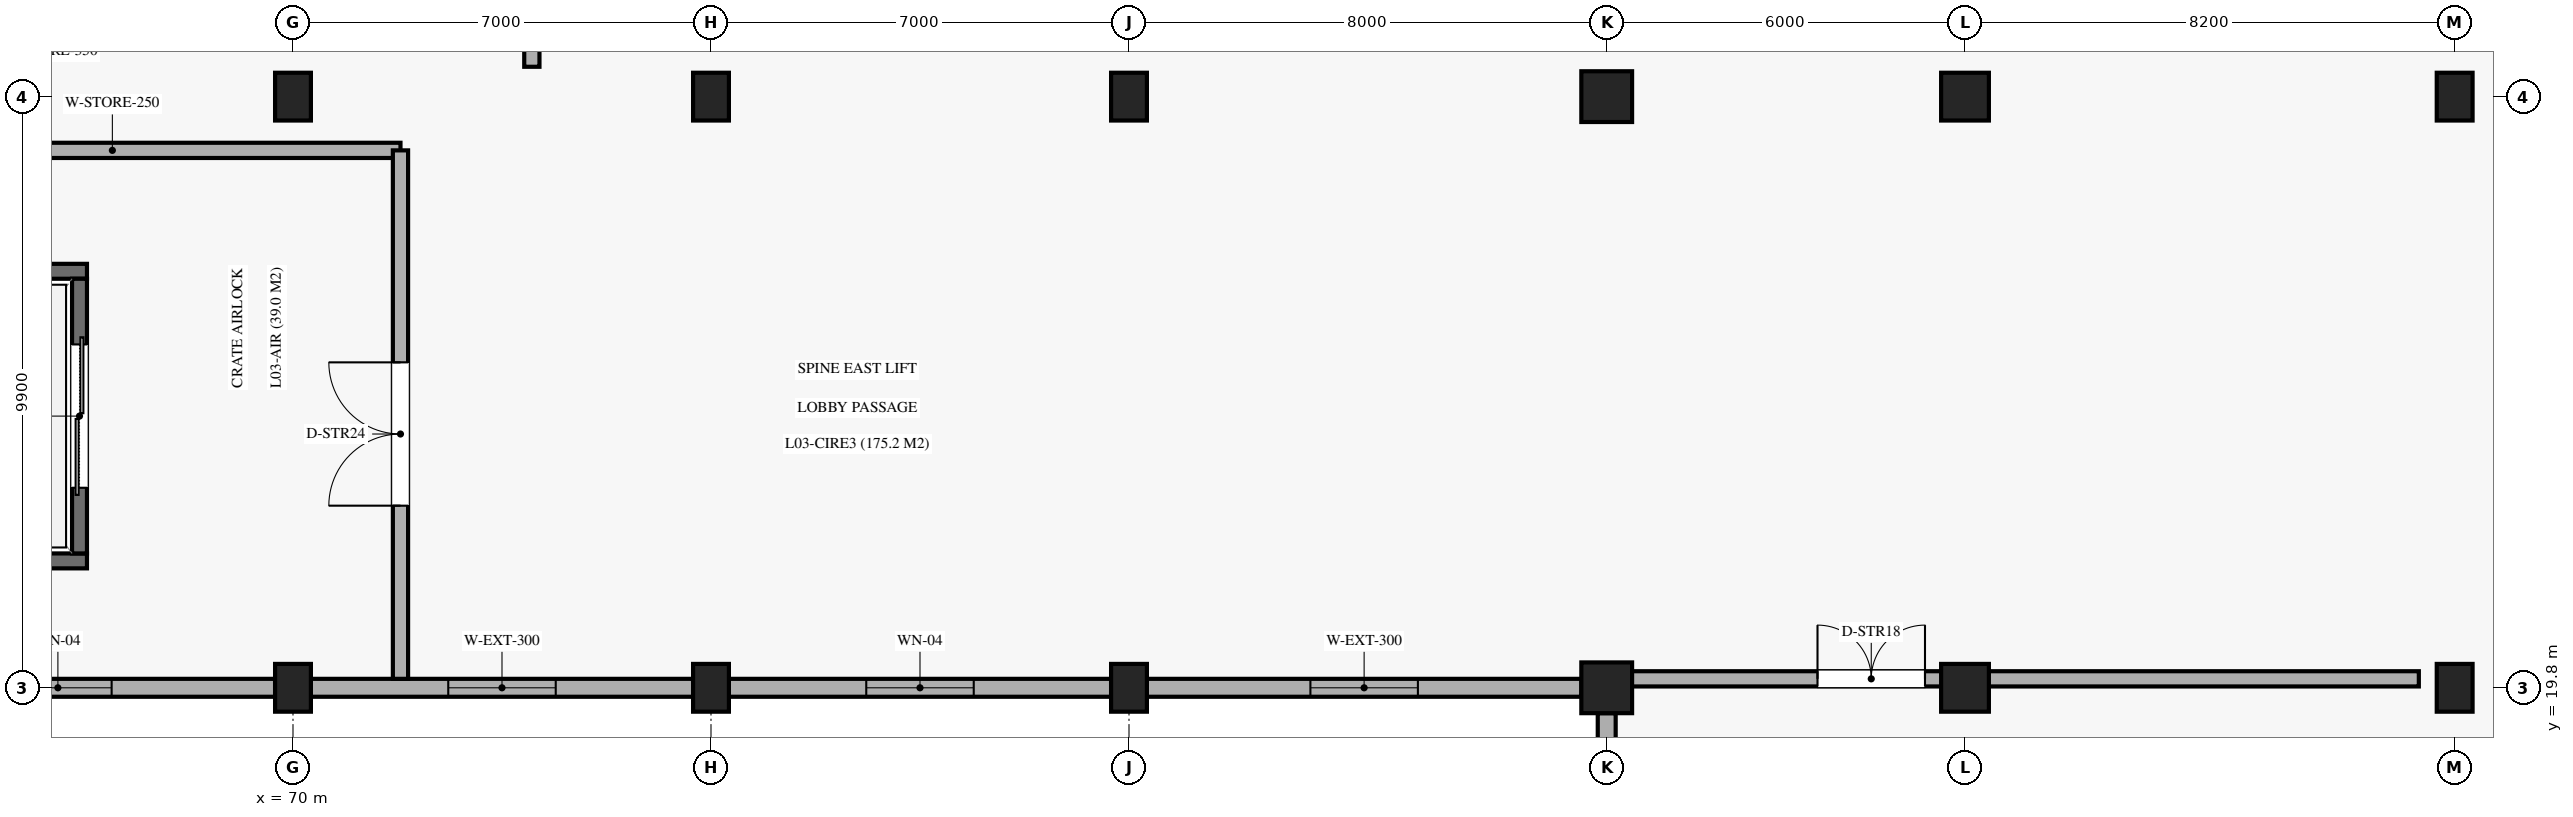
"""IFC4 building model, lengths in metres.
Left out: names, types, materials, properties, quantities, classifications, styles, units other than length and angle.
Written with IfcOpenShell. Run it as: python <this file> out.ifc"""

import sys

from ifc_helpers import new_model, si_unit, direction, frame, frame_2d, origin, origin_2d, place, context, subcontext, project, spatial, rectangle, extrude, element, fill, save


model = new_model("IFC4")
c1 = context("Model", 3, precision=1e-05, world=origin(), true_north=direction((0.0, 1.0)))
c2 = subcontext(c1, "Body", "Model", "MODEL_VIEW")
j1 = project(units=[si_unit("LENGTHUNIT", "METRE"), si_unit("PLANEANGLEUNIT", "RADIAN")], contexts=[c1])
p1 = place(None, origin())
s1 = spatial("IfcSite", under=j1, at=p1, CompositionType="ELEMENT")
p2 = place(p1, origin())
s2 = spatial("IfcBuilding", under=s1, at=p2, CompositionType="ELEMENT")
p3 = place(p2, frame((0.0, 0.0, 16.32)))
s3 = spatial("IfcBuildingStorey", under=s2, at=p3, CompositionType="ELEMENT", Elevation=16.32)
for number, where, z_axis, x_axis in (
    (1, (70.0, 19.8, 0.0), (0.0, 0.0, 1.0), (1.0, 0.0, 0.0)),
    (2, (70.0, 29.7, 0.0), (0.0, 0.0, 1.0), (1.0, 0.0, 0.0)),
    (3, (77.0, 19.8, 0.0), (0.0, 0.0, 1.0), (1.0, 0.0, 0.0)),
    (4, (77.0, 29.7, 0.0), (0.0, 0.0, 1.0), (1.0, 0.0, 0.0)),
    (5, (84.0, 19.8, 0.0), (0.0, 0.0, 1.0), (1.0, 0.0, 0.0)),
    (6, (84.0, 29.7, 0.0), (0.0, 0.0, 1.0), (1.0, 0.0, 0.0)),
):
    element("IfcColumn", number, at=place(p3, frame(where, z_axis=z_axis, x_axis=x_axis)), inside=s3, PredefinedType="COLUMN", context=c2, shape_type="SweptSolid", body=[
        extrude(rectangle(XDim=0.6, YDim=0.8, at=origin_2d()), origin(), (0.0, 0.0, 1.0), 6.12),
    ])
for number, where, z_axis, x_axis in (
    (7, (92.0, 19.8, 0.0), (0.0, 0.0, 1.0), (1.0, 0.0, 0.0)),
    (8, (92.0, 29.7, 0.0), (0.0, 0.0, 1.0), (1.0, 0.0, 0.0)),
):
    element("IfcColumn", number, at=place(p3, frame(where, z_axis=z_axis, x_axis=x_axis)), inside=s3, PredefinedType="COLUMN", context=c2, shape_type="SweptSolid", body=[
        extrude(rectangle(XDim=0.85, YDim=0.85, at=origin_2d()), origin(), (0.0, 0.0, 1.0), 6.12),
    ])
for number, where, z_axis, x_axis in (
    (9, (98.0, 19.8, 0.0), (0.0, 0.0, 1.0), (1.0, 0.0, 0.0)),
    (10, (98.0, 29.7, 0.0), (0.0, 0.0, 1.0), (1.0, 0.0, 0.0)),
):
    element("IfcColumn", number, at=place(p3, frame(where, z_axis=z_axis, x_axis=x_axis)), inside=s3, PredefinedType="COLUMN", context=c2, shape_type="SweptSolid", body=[
        extrude(rectangle(XDim=0.8, YDim=0.8, at=origin_2d()), origin(), (0.0, 0.0, 1.0), 6.12),
    ])
for number, where, z_axis, x_axis in (
    (11, (106.2, 19.8, 0.0), (0.0, 0.0, 1.0), (1.0, 0.0, 0.0)),
    (12, (106.2, 29.7, 0.0), (0.0, 0.0, 1.0), (1.0, 0.0, 0.0)),
):
    element("IfcColumn", number, at=place(p3, frame(where, z_axis=z_axis, x_axis=x_axis)), inside=s3, PredefinedType="COLUMN", context=c2, shape_type="SweptSolid", body=[
        extrude(rectangle(XDim=0.6, YDim=0.8, at=origin_2d()), origin(), (0.0, 0.0, 1.0), 6.12),
    ])
p4 = place(p3, frame((62.425, 19.8, 0.0), z_axis=(0.0, 0.0, 1.0), x_axis=(1.0, 0.0, 0.0)))
e13 = element("IfcWall", 13, at=p4, inside=s3, PredefinedType="SOLIDWALL", context=c2, shape_type="SweptSolid", body=[
    extrude(rectangle(XDim=7.275, YDim=0.3, at=frame_2d((3.637, 0.0))), origin(), (0.0, 0.0, 1.0), 5.08),
])
p5 = place(p4, frame((2.738, 0.0, 1.05)))
e14 = element("IfcOpeningElement", 14, at=p5, cuts=e13, PredefinedType="OPENING", context=c2, shape_type="SweptSolid", body=[
    extrude(rectangle(XDim=1.8, YDim=1.7, at=frame_2d((0.9, 0.85))), frame((0.0, 0.16, 0.0), z_axis=(0.0, -1.0, 0.0), x_axis=(1.0, 0.0, 0.0)), (0.0, 0.0, 1.0), 0.32),
])
p6 = place(p3, frame((70.3, 19.8, 0.0), z_axis=(0.0, 0.0, 1.0), x_axis=(1.0, 0.0, 0.0)))
e15 = element("IfcWall", 15, at=p6, inside=s3, PredefinedType="SOLIDWALL", context=c2, shape_type="SweptSolid", body=[
    extrude(rectangle(XDim=6.4, YDim=0.3, at=frame_2d((3.2, 0.0))), origin(), (0.0, 0.0, 1.0), 5.08),
])
p7 = place(p6, frame((2.3, 0.0, 1.05)))
e16 = element("IfcOpeningElement", 16, at=p7, cuts=e15, PredefinedType="OPENING", context=c2, shape_type="SweptSolid", body=[
    extrude(rectangle(XDim=1.8, YDim=1.7, at=frame_2d((0.9, 0.85))), frame((0.0, 0.16, 0.0), z_axis=(0.0, -1.0, 0.0), x_axis=(1.0, 0.0, 0.0)), (0.0, 0.0, 1.0), 0.32),
])
p8 = place(p3, frame((77.3, 19.8, 0.0), z_axis=(0.0, 0.0, 1.0), x_axis=(1.0, 0.0, 0.0)))
e17 = element("IfcWall", 17, at=p8, inside=s3, PredefinedType="SOLIDWALL", context=c2, shape_type="SweptSolid", body=[
    extrude(rectangle(XDim=6.4, YDim=0.3, at=frame_2d((3.2, 0.0))), origin(), (0.0, 0.0, 1.0), 5.08),
])
p9 = place(p8, frame((2.3, 0.0, 1.05)))
e18 = element("IfcOpeningElement", 18, at=p9, cuts=e17, PredefinedType="OPENING", context=c2, shape_type="SweptSolid", body=[
    extrude(rectangle(XDim=1.8, YDim=1.7, at=frame_2d((0.9, 0.85))), frame((0.0, 0.16, 0.0), z_axis=(0.0, -1.0, 0.0), x_axis=(1.0, 0.0, 0.0)), (0.0, 0.0, 1.0), 0.32),
])
p10 = place(p3, frame((84.3, 19.8, 0.0), z_axis=(0.0, 0.0, 1.0), x_axis=(1.0, 0.0, 0.0)))
e19 = element("IfcWall", 19, at=p10, inside=s3, PredefinedType="SOLIDWALL", context=c2, shape_type="SweptSolid", body=[
    extrude(rectangle(XDim=7.275, YDim=0.3, at=frame_2d((3.637, 0.0))), origin(), (0.0, 0.0, 1.0), 5.08),
])
p11 = place(p10, frame((2.738, 0.0, 1.05)))
e20 = element("IfcOpeningElement", 20, at=p11, cuts=e19, PredefinedType="OPENING", context=c2, shape_type="SweptSolid", body=[
    extrude(rectangle(XDim=1.8, YDim=1.7, at=frame_2d((0.9, 0.85))), frame((0.0, 0.16, 0.0), z_axis=(0.0, -1.0, 0.0), x_axis=(1.0, 0.0, 0.0)), (0.0, 0.0, 1.0), 0.32),
])
p12 = place(p3, frame((92.0, 10.25, 0.0), z_axis=(0.0, 0.0, 1.0), x_axis=(0.0, 1.0, 0.0)))
e21 = element("IfcWall", 21, at=p12, inside=s3, PredefinedType="SOLIDWALL", context=c2, shape_type="SweptSolid", body=[
    extrude(rectangle(XDim=9.125, YDim=0.3, at=frame_2d((4.562, 0.0))), origin(), (0.0, 0.0, 1.0), 5.08),
])
p13 = place(p12, frame((3.663, 0.0, 1.05)))
e22 = element("IfcOpeningElement", 22, at=p13, cuts=e21, PredefinedType="OPENING", context=c2, shape_type="SweptSolid", body=[
    extrude(rectangle(XDim=1.8, YDim=1.7, at=frame_2d((0.9, 0.85))), frame((0.0, 0.16, 0.0), z_axis=(0.0, -1.0, 0.0), x_axis=(1.0, 0.0, 0.0)), (0.0, 0.0, 1.0), 0.32),
])
for number, where, z_axis, x_axis in (
    (23, (62.65, 21.925, 0.0), (0.0, 0.0, 1.0), (1.0, 0.0, 0.0)),
    (24, (62.65, 26.775, 0.0), (0.0, 0.0, 1.0), (1.0, 0.0, 0.0)),
):
    element("IfcWall", number, at=place(p3, frame(where, z_axis=z_axis, x_axis=x_axis)), inside=s3, PredefinedType="SOLIDWALL", context=c2, shape_type="SweptSolid", body=[
        extrude(rectangle(XDim=3.9, YDim=0.25, at=frame_2d((1.95, 0.0))), origin(), (0.0, 0.0, 1.0), 5.84),
    ])
p14 = place(p3, frame((66.425, 22.05, 0.0), z_axis=(0.0, 0.0, 1.0), x_axis=(0.0, 1.0, 0.0)))
e25 = element("IfcWall", 25, at=p14, inside=s3, PredefinedType="SOLIDWALL", context=c2, shape_type="SweptSolid", body=[
    extrude(rectangle(XDim=4.6, YDim=0.25, at=frame_2d((2.3, 0.0))), origin(), (0.0, 0.0, 1.0), 5.84),
])
p15 = place(p14, frame((1.1, 0.0, 0.0)))
e26 = element("IfcOpeningElement", 26, at=p15, cuts=e25, PredefinedType="OPENING", context=c2, shape_type="SweptSolid", body=[
    extrude(rectangle(XDim=2.4, YDim=2.65, at=frame_2d((1.2, 1.325))), frame((0.0, 0.135, 0.0), z_axis=(0.0, -1.0, 0.0), x_axis=(1.0, 0.0, 0.0)), (0.0, 0.0, 1.0), 0.27),
])
p16 = place(p3, frame((62.15, 28.8, 0.0), z_axis=(0.0, 0.0, 1.0), x_axis=(1.0, 0.0, 0.0)))
e27 = element("IfcWall", 27, at=p16, inside=s3, PredefinedType="SOLIDWALL", context=c2, shape_type="SweptSolid", body=[
    extrude(rectangle(XDim=9.65, YDim=0.255, at=frame_2d((4.825, 0.0))), origin(), (0.0, 0.0, 1.0), 4.98),
])
p17 = place(p3, frame((71.8, 19.95, 0.0), z_axis=(0.0, 0.0, 1.0), x_axis=(0.0, 1.0, 0.0)))
e28 = element("IfcWall", 28, at=p17, inside=s3, PredefinedType="SOLIDWALL", context=c2, shape_type="SweptSolid", body=[
    extrude(rectangle(XDim=8.85, YDim=0.255, at=frame_2d((4.425, 0.0))), origin(), (0.0, 0.0, 1.0), 4.98),
])
p18 = place(p17, frame((2.9, 0.0, 0.0)))
e29 = element("IfcOpeningElement", 29, at=p18, cuts=e28, PredefinedType="OPENING", context=c2, shape_type="SweptSolid", body=[
    extrude(rectangle(XDim=2.4, YDim=2.5, at=frame_2d((1.2, 1.25))), frame((0.0, 0.137, 0.0), z_axis=(0.0, -1.0, 0.0), x_axis=(1.0, 0.0, 0.0)), (0.0, 0.0, 1.0), 0.275),
])
p19 = place(p3, frame((92.35, 19.95, 0.0), z_axis=(0.0, 0.0, 1.0), x_axis=(1.0, 0.0, 0.0)))
e30 = element("IfcWall", 30, at=p19, inside=s3, PredefinedType="SOLIDWALL", context=c2, shape_type="SweptSolid", body=[
    extrude(rectangle(XDim=13.25, YDim=0.255, at=frame_2d((6.625, 0.0))), origin(), (0.0, 0.0, 1.0), 4.98),
])
p20 = place(p19, frame((3.18, 0.0, 0.0)))
e31 = element("IfcOpeningElement", 31, at=p20, cuts=e30, PredefinedType="OPENING", context=c2, shape_type="SweptSolid", body=[
    extrude(rectangle(XDim=1.8, YDim=2.35, at=frame_2d((0.9, 1.175))), frame((0.0, 0.137, 0.0), z_axis=(0.0, -1.0, 0.0), x_axis=(1.0, 0.0, 0.0)), (0.0, 0.0, 1.0), 0.275),
])
p21 = place(p3, frame((74.0, 30.2, 0.0), z_axis=(0.0, 0.0, 1.0), x_axis=(0.0, 1.0, 0.0)))
e32 = element("IfcWall", 32, at=p21, inside=s3, PredefinedType="SOLIDWALL", context=c2, shape_type="SweptSolid", body=[
    extrude(rectangle(XDim=18.6, YDim=0.255, at=frame_2d((9.3, 0.0))), origin(), (0.0, 0.0, 1.0), 4.98),
])
p22 = place(p21, frame((7.0, 0.0, 0.0)))
e33 = element("IfcOpeningElement", 33, at=p22, cuts=e32, PredefinedType="OPENING", context=c2, shape_type="SweptSolid", body=[
    extrude(rectangle(XDim=1.8, YDim=2.35, at=frame_2d((0.9, 1.175))), frame((0.0, 0.137, 0.0), z_axis=(0.0, -1.0, 0.0), x_axis=(1.0, 0.0, 0.0)), (0.0, 0.0, 1.0), 0.275),
])
p23 = place(p5, origin())
e34 = element("IfcWindow", 34, at=p23, inside=s3, PartitioningType="SINGLE_PANEL", PredefinedType="WINDOW", context=c2, shape_type="SweptSolid", body=[
    extrude(rectangle(XDim=1.8, YDim=1.7, at=frame_2d((0.9, 0.85))), frame((0.0, 0.03, 0.0), z_axis=(0.0, -1.0, 0.0), x_axis=(1.0, 0.0, 0.0)), (0.0, 0.0, 1.0), 0.06),
])
fill(e14, e34)
p24 = place(p7, origin())
e35 = element("IfcWindow", 35, at=p24, inside=s3, PartitioningType="SINGLE_PANEL", PredefinedType="WINDOW", context=c2, shape_type="SweptSolid", body=[
    extrude(rectangle(XDim=1.8, YDim=1.7, at=frame_2d((0.9, 0.85))), frame((0.0, 0.03, 0.0), z_axis=(0.0, -1.0, 0.0), x_axis=(1.0, 0.0, 0.0)), (0.0, 0.0, 1.0), 0.06),
])
fill(e16, e35)
p25 = place(p9, origin())
e36 = element("IfcWindow", 36, at=p25, inside=s3, PartitioningType="SINGLE_PANEL", PredefinedType="WINDOW", context=c2, shape_type="SweptSolid", body=[
    extrude(rectangle(XDim=1.8, YDim=1.7, at=frame_2d((0.9, 0.85))), frame((0.0, 0.03, 0.0), z_axis=(0.0, -1.0, 0.0), x_axis=(1.0, 0.0, 0.0)), (0.0, 0.0, 1.0), 0.06),
])
fill(e18, e36)
p26 = place(p11, origin())
e37 = element("IfcWindow", 37, at=p26, inside=s3, PartitioningType="SINGLE_PANEL", PredefinedType="WINDOW", context=c2, shape_type="SweptSolid", body=[
    extrude(rectangle(XDim=1.8, YDim=1.7, at=frame_2d((0.9, 0.85))), frame((0.0, 0.03, 0.0), z_axis=(0.0, -1.0, 0.0), x_axis=(1.0, 0.0, 0.0)), (0.0, 0.0, 1.0), 0.06),
])
fill(e20, e37)
p27 = place(p15, origin())
e38 = element("IfcDoor", 38, at=p27, inside=s3, OperationType="DOUBLE_DOOR_SLIDING", PredefinedType="DOOR", context=c2, shape_type="SweptSolid", body=[
    extrude(rectangle(XDim=2.4, YDim=2.65, at=frame_2d((1.2, 1.325))), frame((0.0, 0.025, 0.0), z_axis=(0.0, -1.0, 0.0), x_axis=(1.0, 0.0, 0.0)), (0.0, 0.0, 1.0), 0.05),
])
fill(e26, e38)
p28 = place(p18, origin())
e39 = element("IfcDoor", 39, at=p28, inside=s3, OperationType="DOUBLE_DOOR_SINGLE_SWING", PredefinedType="DOOR", context=c2, shape_type="SweptSolid", body=[
    extrude(rectangle(XDim=2.4, YDim=2.5, at=frame_2d((1.2, 1.25))), frame((0.0, 0.025, 0.0), z_axis=(0.0, -1.0, 0.0), x_axis=(1.0, 0.0, 0.0)), (0.0, 0.0, 1.0), 0.05),
])
fill(e29, e39)
p29 = place(p20, origin())
e40 = element("IfcDoor", 40, at=p29, inside=s3, OperationType="DOUBLE_DOOR_SINGLE_SWING", PredefinedType="DOOR", context=c2, shape_type="SweptSolid", body=[
    extrude(rectangle(XDim=1.8, YDim=2.35, at=frame_2d((0.9, 1.175))), frame((0.0, 0.025, 0.0), z_axis=(0.0, -1.0, 0.0), x_axis=(1.0, 0.0, 0.0)), (0.0, 0.0, 1.0), 0.05),
])
fill(e31, e40)
save(model, sys.argv[1])
